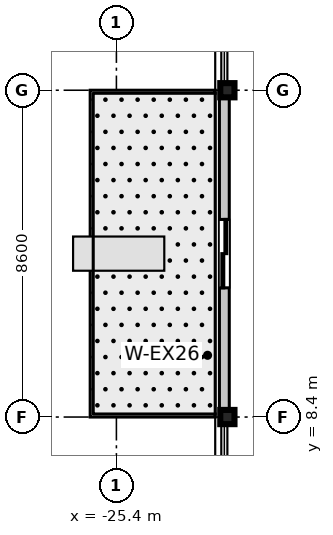
"""IFC4 building model, lengths in metres.
Left out: names, types, materials, properties, quantities, classifications, styles, units other than length and angle.
Written with IfcOpenShell. Run it as: python <this file> out.ifc"""

import sys

from ifc_helpers import new_model, si_unit, direction, frame, frame_2d, origin, origin_2d, place, context, subcontext, project, spatial, rectangle, i_section, extrude, source, transform, mapped, element, fill, save


model = new_model("IFC4")
c1 = context("Model", 3, precision=1e-05, world=origin(), true_north=direction((0.0, 1.0)))
c2 = subcontext(c1, "Body", "Model", "MODEL_VIEW")
j1 = project(units=[si_unit("LENGTHUNIT", "METRE"), si_unit("PLANEANGLEUNIT", "RADIAN")], contexts=[c1])
p1 = place(None, origin())
s1 = spatial("IfcSite", under=j1, at=p1, CompositionType="ELEMENT")
p2 = place(p1, origin())
s2 = spatial("IfcBuilding", under=s1, at=p2, CompositionType="ELEMENT")
p3 = place(p2, frame((0.0, 0.0, 334.75)))
s3 = spatial("IfcBuildingStorey", under=s2, at=p3, CompositionType="ELEMENT", Elevation=334.75)
m1 = source(origin(), c2, "Body", "SweptSolid", [
    extrude(i_section(OverallWidth=0.374, OverallDepth=0.374, WebThickness=0.014, FlangeThickness=0.023, at=origin_2d()), origin(), (0.0, 0.0, 1.0), 3.755),
])
for number, where, z_axis, x_axis in (
    (1, (-22.48, 8.4, 0.0), (0.0, 0.0, 1.0), (1.0, 0.0, 0.0)),
    (2, (-22.48, 17.0, 0.0), (0.0, 0.0, 1.0), (1.0, 0.0, 0.0)),
):
    element("IfcColumn", number, at=place(p3, frame(where, z_axis=z_axis, x_axis=x_axis)), inside=s3, PredefinedType="COLUMN", context=c2, shape_type="MappedRepresentation", body=[
        mapped(m1, transform((0.0, 0.0, 0.0), scale=1.0)),
    ])
m2 = source(origin(), c2, "Body", "SweptSolid", [
    extrude(rectangle(XDim=8.6, YDim=0.26, at=frame_2d((4.3, 0.0))), origin(), (0.0, 0.0, 1.0), 2.95),
])
p4 = place(p3, frame((-22.56, 8.4, 0.0), z_axis=(0.0, 0.0, 1.0), x_axis=(0.0, 1.0, 0.0)))
e3 = element("IfcWall", 3, at=p4, inside=s3, PredefinedType="STANDARD", context=c2, shape_type="MappedRepresentation", body=[
    mapped(m2, transform((0.0, 0.0, 0.0), scale=1.0)),
])
p5 = place(p4, frame((3.4, 0.0, 0.0)))
e4 = element("IfcOpeningElement", 4, at=p5, cuts=e3, PredefinedType="OPENING", context=c2, shape_type="SweptSolid", body=[
    extrude(rectangle(XDim=1.8, YDim=2.25, at=frame_2d((0.9, 1.125))), frame((0.0, 0.14, 0.0), z_axis=(0.0, -1.0, 0.0), x_axis=(1.0, 0.0, 0.0)), (0.0, 0.0, 1.0), 0.28),
])
m3 = source(origin(), c2, "Body", "SweptSolid", [
    extrude(rectangle(XDim=1.8, YDim=2.25, at=frame_2d((0.9, 1.125))), frame((0.0, 0.025, 0.0), z_axis=(0.0, -1.0, 0.0), x_axis=(1.0, 0.0, 0.0)), (0.0, 0.0, 1.0), 0.05),
])
p6 = place(p5, origin())
e5 = element("IfcDoor", 5, at=p6, inside=s3, OperationType="DOUBLE_DOOR_SLIDING", PredefinedType="DOOR", context=c2, shape_type="MappedRepresentation", body=[
    mapped(m3, transform((0.0, 0.0, 0.0), scale=1.0)),
])
fill(e4, e5)
save(model, sys.argv[1])
